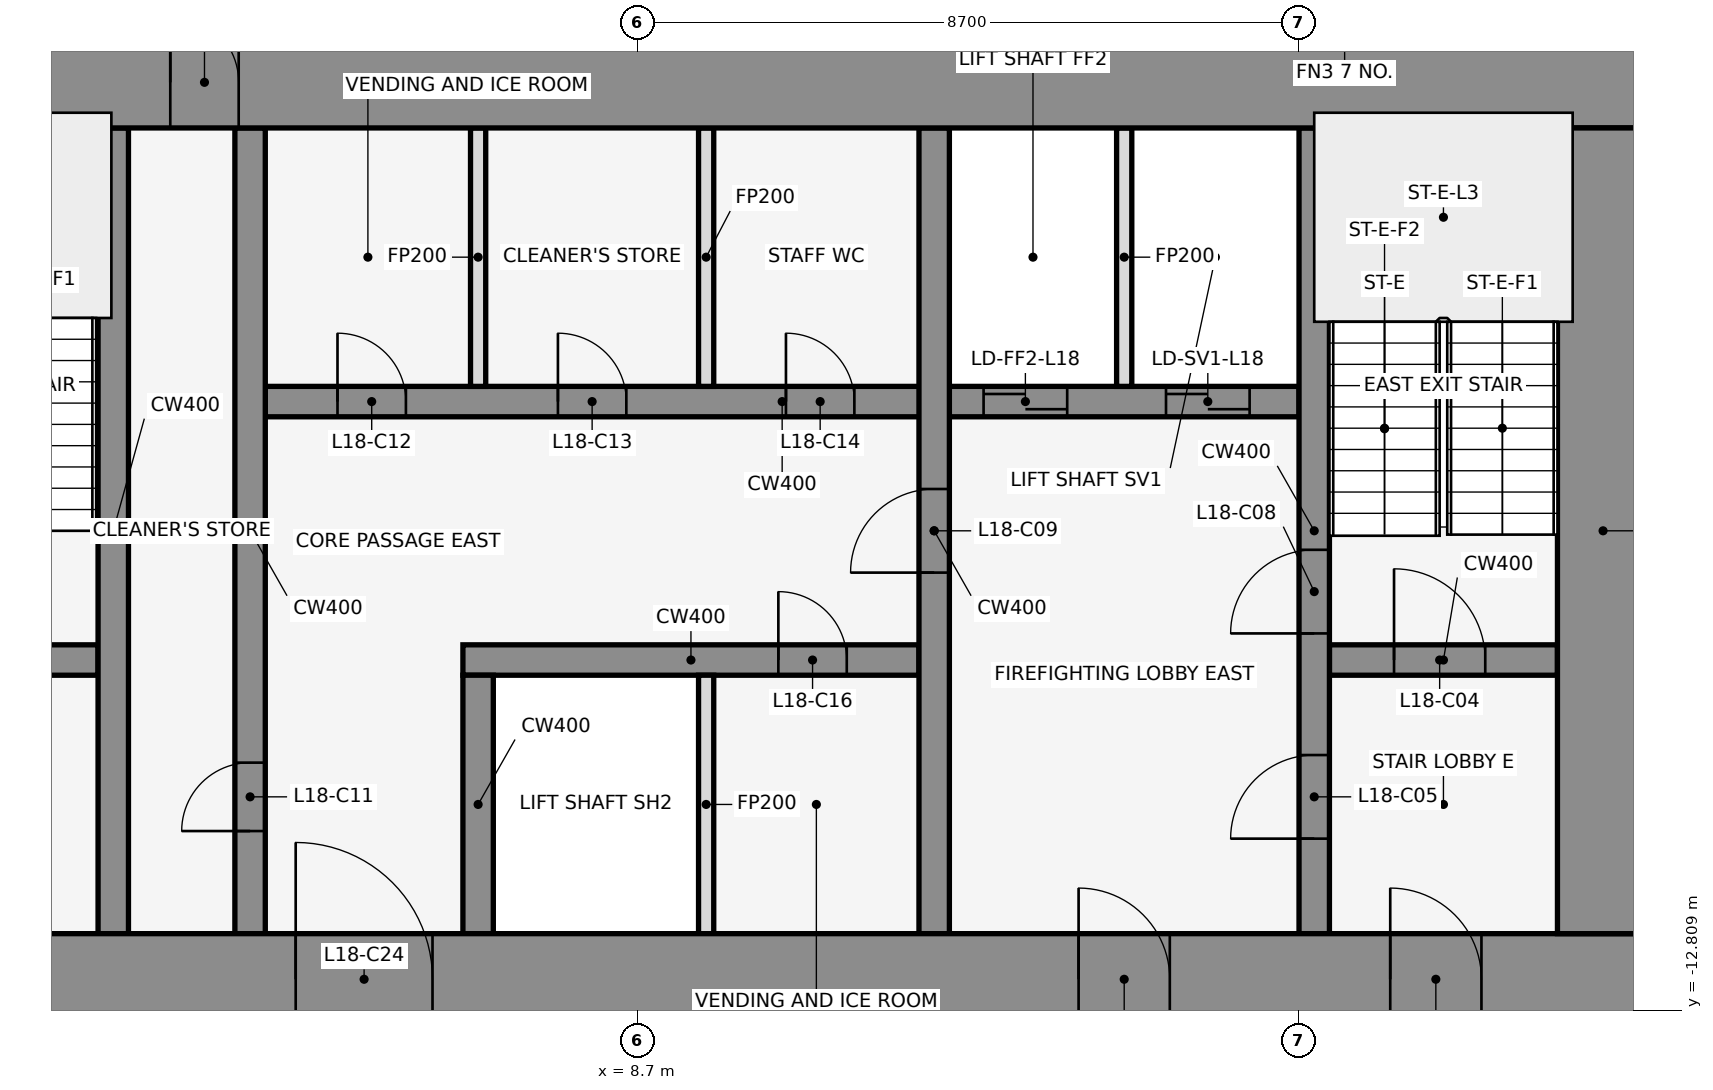
"""IFC4 building model, lengths in metres.
Left out: names, types, materials, properties, quantities, classifications, styles, units other than length and angle.
Written with IfcOpenShell. Run it as: python <this file> out.ifc"""

import sys

from ifc_helpers import new_model, si_unit, direction, frame, frame_2d, origin, place, context, subcontext, project, spatial, rectangle, extrude, element, fill, save


model = new_model("IFC4")
c1 = context("Model", 3, precision=1e-05, world=origin(), true_north=direction((0.0, 1.0)))
c2 = subcontext(c1, "Body", "Model", "MODEL_VIEW")
j1 = project(units=[si_unit("LENGTHUNIT", "METRE"), si_unit("PLANEANGLEUNIT", "RADIAN")], contexts=[c1])
p1 = place(None, origin())
s1 = spatial("IfcSite", under=j1, at=p1, CompositionType="ELEMENT")
p2 = place(p1, origin())
s2 = spatial("IfcBuilding", under=s1, at=p2, CompositionType="ELEMENT")
p3 = place(p2, frame((0.0, 0.0, 89.9)))
s3 = spatial("IfcBuildingStorey", under=s2, at=p3, CompositionType="ELEMENT", Elevation=89.9)
for number, where, z_axis, x_axis in (
    (1, (16.432, -0.105, 0.0), (0.0, 0.0, 1.0), (-0.84, 0.543, 0.0)),
    (2, (1.901, 1.08, 0.0), (0.0, 0.0, 1.0), (-0.84, -0.543, 0.0)),
):
    element("IfcWall", number, at=place(p3, frame(where, z_axis=z_axis, x_axis=x_axis)), inside=s3, PredefinedType="STANDARD", context=c2, shape_type="SweptSolid", body=[
        extrude(rectangle(XDim=2.183, YDim=0.25, at=frame_2d((1.091, 0.0))), origin(), (0.0, 0.0, 1.0), 3.95),
    ])
p4 = place(p3, frame((-1.6, -8.2, 0.0), z_axis=(0.0, 0.0, 1.0), x_axis=(1.0, 0.0, 0.0)))
e3 = element("IfcWall", 3, at=p4, inside=s3, PredefinedType="SHEAR", context=c2, shape_type="SweptSolid", body=[
    extrude(rectangle(XDim=3.2, YDim=0.4, at=frame_2d((1.6, 0.0))), origin(), (0.0, 0.0, 1.0), 4.1),
])
p5 = place(p4, frame((1.05, 0.0, 0.0)))
e4 = element("IfcOpeningElement", 4, at=p5, cuts=e3, PredefinedType="OPENING", context=c2, shape_type="SweptSolid", body=[
    extrude(rectangle(XDim=1.2, YDim=2.1, at=frame_2d((0.6, 1.05))), frame((0.0, 0.212, 0.0), z_axis=(0.0, -1.0, 0.0), x_axis=(1.0, 0.0, 0.0)), (0.0, 0.0, 1.0), 0.424),
])
p6 = place(p3, frame((6.4, -8.2, 0.0), z_axis=(0.0, 0.0, 1.0), x_axis=(1.0, 0.0, 0.0)))
e5 = element("IfcWall", 5, at=p6, inside=s3, PredefinedType="SHEAR", context=c2, shape_type="SweptSolid", body=[
    extrude(rectangle(XDim=6.0, YDim=0.4, at=frame_2d((3.0, 0.0))), origin(), (0.0, 0.0, 1.0), 4.1),
])
p7 = place(p6, frame((4.15, 0.0, 0.0)))
e6 = element("IfcOpeningElement", 6, at=p7, cuts=e5, PredefinedType="OPENING", context=c2, shape_type="SweptSolid", body=[
    extrude(rectangle(XDim=0.9, YDim=2.1, at=frame_2d((0.45, 1.05))), frame((0.0, 0.212, 0.0), z_axis=(0.0, -1.0, 0.0), x_axis=(1.0, 0.0, 0.0)), (0.0, 0.0, 1.0), 0.424),
])
p8 = place(p3, frame((17.8, -8.2, 0.0), z_axis=(0.0, 0.0, 1.0), x_axis=(1.0, 0.0, 0.0)))
e7 = element("IfcWall", 7, at=p8, inside=s3, PredefinedType="SHEAR", context=c2, shape_type="SweptSolid", body=[
    extrude(rectangle(XDim=3.0, YDim=0.4, at=frame_2d((1.5, 0.0))), origin(), (0.0, 0.0, 1.0), 4.1),
])
p9 = place(p8, frame((0.85, 0.0, 0.0)))
e8 = element("IfcOpeningElement", 8, at=p9, cuts=e7, PredefinedType="OPENING", context=c2, shape_type="SweptSolid", body=[
    extrude(rectangle(XDim=1.2, YDim=2.1, at=frame_2d((0.6, 1.05))), frame((0.0, 0.212, 0.0), z_axis=(0.0, -1.0, 0.0), x_axis=(1.0, 0.0, 0.0)), (0.0, 0.0, 1.0), 0.424),
])
p10 = place(p3, frame((3.8, -4.8, 0.0), z_axis=(0.0, 0.0, 1.0), x_axis=(1.0, 0.0, 0.0)))
e9 = element("IfcWall", 9, at=p10, inside=s3, PredefinedType="SHEAR", context=c2, shape_type="SweptSolid", body=[
    extrude(rectangle(XDim=13.6, YDim=0.4, at=frame_2d((6.8, 0.0))), origin(), (0.0, 0.0, 1.0), 4.1),
])
p11 = place(p10, frame((9.45, 0.0, 0.0)))
e10 = element("IfcOpeningElement", 10, at=p11, cuts=e9, PredefinedType="OPENING", context=c2, shape_type="SweptSolid", body=[
    extrude(rectangle(XDim=1.1, YDim=2.1, at=frame_2d((0.55, 1.05))), frame((0.0, 0.212, 0.0), z_axis=(0.0, -1.0, 0.0), x_axis=(1.0, 0.0, 0.0)), (0.0, 0.0, 1.0), 0.424),
])
p12 = place(p10, frame((11.85, 0.0, 0.0)))
e11 = element("IfcOpeningElement", 11, at=p12, cuts=e9, PredefinedType="OPENING", context=c2, shape_type="SweptSolid", body=[
    extrude(rectangle(XDim=1.1, YDim=2.1, at=frame_2d((0.55, 1.05))), frame((0.0, 0.212, 0.0), z_axis=(0.0, -1.0, 0.0), x_axis=(1.0, 0.0, 0.0)), (0.0, 0.0, 1.0), 0.424),
])
p13 = place(p10, frame((0.95, 0.0, 0.0)))
e12 = element("IfcOpeningElement", 12, at=p13, cuts=e9, PredefinedType="OPENING", context=c2, shape_type="SweptSolid", body=[
    extrude(rectangle(XDim=0.9, YDim=2.1, at=frame_2d((0.45, 1.05))), frame((0.0, 0.212, 0.0), z_axis=(0.0, -1.0, 0.0), x_axis=(1.0, 0.0, 0.0)), (0.0, 0.0, 1.0), 0.424),
])
p14 = place(p10, frame((3.85, 0.0, 0.0)))
e13 = element("IfcOpeningElement", 13, at=p14, cuts=e9, PredefinedType="OPENING", context=c2, shape_type="SweptSolid", body=[
    extrude(rectangle(XDim=0.9, YDim=2.1, at=frame_2d((0.45, 1.05))), frame((0.0, 0.212, 0.0), z_axis=(0.0, -1.0, 0.0), x_axis=(1.0, 0.0, 0.0)), (0.0, 0.0, 1.0), 0.424),
])
p15 = place(p10, frame((6.85, 0.0, 0.0)))
e14 = element("IfcOpeningElement", 14, at=p15, cuts=e9, PredefinedType="OPENING", context=c2, shape_type="SweptSolid", body=[
    extrude(rectangle(XDim=0.9, YDim=2.1, at=frame_2d((0.45, 1.05))), frame((0.0, 0.212, 0.0), z_axis=(0.0, -1.0, 0.0), x_axis=(1.0, 0.0, 0.0)), (0.0, 0.0, 1.0), 0.424),
])
p16 = place(p3, frame((1.8, -11.8, 0.0), z_axis=(0.0, 0.0, 1.0), x_axis=(0.0, 1.0, 0.0)))
e15 = element("IfcWall", 15, at=p16, inside=s3, PredefinedType="SHEAR", context=c2, shape_type="SweptSolid", body=[
    extrude(rectangle(XDim=10.6, YDim=0.4, at=frame_2d((5.3, 0.0))), origin(), (0.0, 0.0, 1.0), 4.1),
])
p17 = place(p3, frame((3.6, -11.8, 0.0), z_axis=(0.0, 0.0, 1.0), x_axis=(0.0, 1.0, 0.0)))
e16 = element("IfcWall", 16, at=p17, inside=s3, PredefinedType="SHEAR", context=c2, shape_type="SweptSolid", body=[
    extrude(rectangle(XDim=10.6, YDim=0.4, at=frame_2d((5.3, 0.0))), origin(), (0.0, 0.0, 1.0), 4.1),
])
p18 = place(p17, frame((1.35, 0.0, 0.0)))
e17 = element("IfcOpeningElement", 17, at=p18, cuts=e16, PredefinedType="OPENING", context=c2, shape_type="SweptSolid", body=[
    extrude(rectangle(XDim=0.9, YDim=2.1, at=frame_2d((0.45, 1.05))), frame((0.0, 0.212, 0.0), z_axis=(0.0, -1.0, 0.0), x_axis=(1.0, 0.0, 0.0)), (0.0, 0.0, 1.0), 0.424),
])
p19 = place(p3, frame((6.6, -11.8, 0.0), z_axis=(0.0, 0.0, 1.0), x_axis=(0.0, 1.0, 0.0)))
e18 = element("IfcWall", 18, at=p19, inside=s3, PredefinedType="SHEAR", context=c2, shape_type="SweptSolid", body=[
    extrude(rectangle(XDim=3.4, YDim=0.4, at=frame_2d((1.7, 0.0))), origin(), (0.0, 0.0, 1.0), 4.1),
])
for number, where, z_axis, x_axis in (
    (19, (6.6, -4.6, 0.0), (0.0, 0.0, 1.0), (0.0, 1.0, 0.0)),
    (20, (9.6, -11.8, 0.0), (0.0, 0.0, 1.0), (0.0, 1.0, 0.0)),
    (21, (9.6, -4.6, 0.0), (0.0, 0.0, 1.0), (0.0, 1.0, 0.0)),
):
    element("IfcWall", number, at=place(p3, frame(where, z_axis=z_axis, x_axis=x_axis)), inside=s3, PredefinedType="PARTITIONING", context=c2, shape_type="SweptSolid", body=[
        extrude(rectangle(XDim=3.4, YDim=0.2, at=frame_2d((1.7, 0.0))), origin(), (0.0, 0.0, 1.0), 3.018),
    ])
p20 = place(p3, frame((12.6, -11.8, 0.0), z_axis=(0.0, 0.0, 1.0), x_axis=(0.0, 1.0, 0.0)))
e22 = element("IfcWall", 22, at=p20, inside=s3, PredefinedType="SHEAR", context=c2, shape_type="SweptSolid", body=[
    extrude(rectangle(XDim=10.6, YDim=0.4, at=frame_2d((5.3, 0.0))), origin(), (0.0, 0.0, 1.0), 4.1),
])
p21 = place(p20, frame((4.75, 0.0, 0.0)))
e23 = element("IfcOpeningElement", 23, at=p21, cuts=e22, PredefinedType="OPENING", context=c2, shape_type="SweptSolid", body=[
    extrude(rectangle(XDim=1.1, YDim=2.1, at=frame_2d((0.55, 1.05))), frame((0.0, 0.212, 0.0), z_axis=(0.0, -1.0, 0.0), x_axis=(1.0, 0.0, 0.0)), (0.0, 0.0, 1.0), 0.424),
])
p22 = place(p3, frame((15.1, -4.6, 0.0), z_axis=(0.0, 0.0, 1.0), x_axis=(0.0, 1.0, 0.0)))
e24 = element("IfcWall", 24, at=p22, inside=s3, PredefinedType="PARTITIONING", context=c2, shape_type="SweptSolid", body=[
    extrude(rectangle(XDim=3.4, YDim=0.2, at=frame_2d((1.7, 0.0))), origin(), (0.0, 0.0, 1.0), 3.018),
])
p23 = place(p3, frame((17.6, -11.8, 0.0), z_axis=(0.0, 0.0, 1.0), x_axis=(0.0, 1.0, 0.0)))
e25 = element("IfcWall", 25, at=p23, inside=s3, PredefinedType="SHEAR", context=c2, shape_type="SweptSolid", body=[
    extrude(rectangle(XDim=10.6, YDim=0.4, at=frame_2d((5.3, 0.0))), origin(), (0.0, 0.0, 1.0), 4.1),
])
p24 = place(p23, frame((1.25, 0.0, 0.0)))
e26 = element("IfcOpeningElement", 26, at=p24, cuts=e25, PredefinedType="OPENING", context=c2, shape_type="SweptSolid", body=[
    extrude(rectangle(XDim=1.1, YDim=2.1, at=frame_2d((0.55, 1.05))), frame((0.0, 0.212, 0.0), z_axis=(0.0, -1.0, 0.0), x_axis=(1.0, 0.0, 0.0)), (0.0, 0.0, 1.0), 0.424),
])
p25 = place(p23, frame((3.95, 0.0, 0.0)))
e27 = element("IfcOpeningElement", 27, at=p25, cuts=e25, PredefinedType="OPENING", context=c2, shape_type="SweptSolid", body=[
    extrude(rectangle(XDim=1.1, YDim=2.1, at=frame_2d((0.55, 1.05))), frame((0.0, 0.212, 0.0), z_axis=(0.0, -1.0, 0.0), x_axis=(1.0, 0.0, 0.0)), (0.0, 0.0, 1.0), 0.424),
])
p26 = place(p3, frame((-22.0, -0.6, 0.0), z_axis=(0.0, 0.0, 1.0), x_axis=(1.0, 0.0, 0.0)))
e28 = element("IfcWall", 28, at=p26, inside=s3, PredefinedType="SHEAR", context=c2, shape_type="SweptSolid", body=[
    extrude(rectangle(XDim=44.0, YDim=1.2, at=frame_2d((22.0, 0.0))), origin(), (0.0, 0.0, 1.0), 4.1),
])
p27 = place(p26, frame((18.55, 0.0, 0.0)))
e29 = element("IfcOpeningElement", 29, at=p27, cuts=e28, PredefinedType="OPENING", context=c2, shape_type="SweptSolid", body=[
    extrude(rectangle(XDim=0.9, YDim=2.1, at=frame_2d((0.45, 1.05))), frame((0.0, 0.612, 0.0), z_axis=(0.0, -1.0, 0.0), x_axis=(1.0, 0.0, 0.0)), (0.0, 0.0, 1.0), 1.224),
])
p28 = place(p26, frame((24.55, 0.0, 0.0)))
e30 = element("IfcOpeningElement", 30, at=p28, cuts=e28, PredefinedType="OPENING", context=c2, shape_type="SweptSolid", body=[
    extrude(rectangle(XDim=0.9, YDim=2.1, at=frame_2d((0.45, 1.05))), frame((0.0, 0.612, 0.0), z_axis=(0.0, -1.0, 0.0), x_axis=(1.0, 0.0, 0.0)), (0.0, 0.0, 1.0), 1.224),
])
p29 = place(p3, frame((-22.0, -12.4, 0.0), z_axis=(0.0, 0.0, 1.0), x_axis=(1.0, 0.0, 0.0)))
e31 = element("IfcWall", 31, at=p29, inside=s3, PredefinedType="SHEAR", context=c2, shape_type="SweptSolid", body=[
    extrude(rectangle(XDim=44.0, YDim=1.2, at=frame_2d((22.0, 0.0))), origin(), (0.0, 0.0, 1.0), 4.1),
])
p30 = place(p29, frame((2.2, 0.0, 0.0)))
e32 = element("IfcOpeningElement", 32, at=p30, cuts=e31, PredefinedType="OPENING", context=c2, shape_type="SweptSolid", body=[
    extrude(rectangle(XDim=1.2, YDim=2.1, at=frame_2d((0.6, 1.05))), frame((0.0, 0.612, 0.0), z_axis=(0.0, -1.0, 0.0), x_axis=(1.0, 0.0, 0.0)), (0.0, 0.0, 1.0), 1.224),
])
p31 = place(p29, frame((21.4, 0.0, 0.0)))
e33 = element("IfcOpeningElement", 33, at=p31, cuts=e31, PredefinedType="OPENING", context=c2, shape_type="SweptSolid", body=[
    extrude(rectangle(XDim=1.2, YDim=2.1, at=frame_2d((0.6, 1.05))), frame((0.0, 0.612, 0.0), z_axis=(0.0, -1.0, 0.0), x_axis=(1.0, 0.0, 0.0)), (0.0, 0.0, 1.0), 1.224),
])
p32 = place(p29, frame((40.6, 0.0, 0.0)))
e34 = element("IfcOpeningElement", 34, at=p32, cuts=e31, PredefinedType="OPENING", context=c2, shape_type="SweptSolid", body=[
    extrude(rectangle(XDim=1.2, YDim=2.1, at=frame_2d((0.6, 1.05))), frame((0.0, 0.612, 0.0), z_axis=(0.0, -1.0, 0.0), x_axis=(1.0, 0.0, 0.0)), (0.0, 0.0, 1.0), 1.224),
])
p33 = place(p29, frame((16.0, 0.0, 0.0)))
e35 = element("IfcOpeningElement", 35, at=p33, cuts=e31, PredefinedType="OPENING", context=c2, shape_type="SweptSolid", body=[
    extrude(rectangle(XDim=1.8, YDim=2.1, at=frame_2d((0.9, 1.05))), frame((0.0, 0.612, 0.0), z_axis=(0.0, -1.0, 0.0), x_axis=(1.0, 0.0, 0.0)), (0.0, 0.0, 1.0), 1.224),
])
p34 = place(p29, frame((6.3, 0.0, 0.0)))
e36 = element("IfcOpeningElement", 36, at=p34, cuts=e31, PredefinedType="OPENING", context=c2, shape_type="SweptSolid", body=[
    extrude(rectangle(XDim=1.2, YDim=2.1, at=frame_2d((0.6, 1.05))), frame((0.0, 0.612, 0.0), z_axis=(0.0, -1.0, 0.0), x_axis=(1.0, 0.0, 0.0)), (0.0, 0.0, 1.0), 1.224),
])
p35 = place(p29, frame((26.2, 0.0, 0.0)))
e37 = element("IfcOpeningElement", 37, at=p35, cuts=e31, PredefinedType="OPENING", context=c2, shape_type="SweptSolid", body=[
    extrude(rectangle(XDim=1.8, YDim=2.1, at=frame_2d((0.9, 1.05))), frame((0.0, 0.612, 0.0), z_axis=(0.0, -1.0, 0.0), x_axis=(1.0, 0.0, 0.0)), (0.0, 0.0, 1.0), 1.224),
])
p36 = place(p29, frame((36.5, 0.0, 0.0)))
e38 = element("IfcOpeningElement", 38, at=p36, cuts=e31, PredefinedType="OPENING", context=c2, shape_type="SweptSolid", body=[
    extrude(rectangle(XDim=1.2, YDim=2.1, at=frame_2d((0.6, 1.05))), frame((0.0, 0.612, 0.0), z_axis=(0.0, -1.0, 0.0), x_axis=(1.0, 0.0, 0.0)), (0.0, 0.0, 1.0), 1.224),
])
p37 = place(p3, frame((21.4, -11.8, 0.0), z_axis=(0.0, 0.0, 1.0), x_axis=(0.0, 1.0, 0.0)))
e39 = element("IfcWall", 39, at=p37, inside=s3, PredefinedType="SHEAR", context=c2, shape_type="SweptSolid", body=[
    extrude(rectangle(XDim=10.6, YDim=1.2, at=frame_2d((5.3, 0.0))), origin(), (0.0, 0.0, 1.0), 4.1),
])
p38 = place(p9, origin())
e40 = element("IfcDoor", 40, at=p38, inside=s3, OperationType="SINGLE_SWING_RIGHT", PredefinedType="DOOR", context=c2, shape_type="SweptSolid", body=[
    extrude(rectangle(XDim=1.2, YDim=2.1, at=frame_2d((0.6, 1.05))), frame((0.0, 0.025, 0.0), z_axis=(0.0, -1.0, 0.0), x_axis=(1.0, 0.0, 0.0)), (0.0, 0.0, 1.0), 0.05),
])
fill(e8, e40)
p39 = place(p24, origin())
e41 = element("IfcDoor", 41, at=p39, inside=s3, OperationType="SINGLE_SWING_LEFT", PredefinedType="DOOR", context=c2, shape_type="SweptSolid", body=[
    extrude(rectangle(XDim=1.1, YDim=2.1, at=frame_2d((0.55, 1.05))), frame((0.0, 0.025, 0.0), z_axis=(0.0, -1.0, 0.0), x_axis=(1.0, 0.0, 0.0)), (0.0, 0.0, 1.0), 0.05),
])
fill(e26, e41)
p40 = place(p11, origin())
e42 = element("IfcDoor", 42, at=p40, inside=s3, OperationType="DOUBLE_DOOR_SLIDING", PredefinedType="DOOR", context=c2, shape_type="SweptSolid", body=[
    extrude(rectangle(XDim=1.1, YDim=2.1, at=frame_2d((0.55, 1.05))), frame((0.0, 0.025, 0.0), z_axis=(0.0, -1.0, 0.0), x_axis=(1.0, 0.0, 0.0)), (0.0, 0.0, 1.0), 0.05),
])
fill(e10, e42)
p41 = place(p12, origin())
e43 = element("IfcDoor", 43, at=p41, inside=s3, OperationType="DOUBLE_DOOR_SLIDING", PredefinedType="DOOR", context=c2, shape_type="SweptSolid", body=[
    extrude(rectangle(XDim=1.1, YDim=2.1, at=frame_2d((0.55, 1.05))), frame((0.0, 0.025, 0.0), z_axis=(0.0, -1.0, 0.0), x_axis=(1.0, 0.0, 0.0)), (0.0, 0.0, 1.0), 0.05),
])
fill(e11, e43)
p42 = place(p25, origin())
e44 = element("IfcDoor", 44, at=p42, inside=s3, OperationType="SINGLE_SWING_RIGHT", PredefinedType="DOOR", context=c2, shape_type="SweptSolid", body=[
    extrude(rectangle(XDim=1.1, YDim=2.1, at=frame_2d((0.55, 1.05))), frame((0.0, 0.025, 0.0), z_axis=(0.0, -1.0, 0.0), x_axis=(1.0, 0.0, 0.0)), (0.0, 0.0, 1.0), 0.05),
])
fill(e27, e44)
p43 = place(p21, frame((1.1, 0.0, 0.0), z_axis=(0.0, 0.0, 1.0), x_axis=(-1.0, 0.0, 0.0)))
e45 = element("IfcDoor", 45, at=p43, inside=s3, OperationType="SINGLE_SWING_RIGHT", PredefinedType="DOOR", context=c2, shape_type="SweptSolid", body=[
    extrude(rectangle(XDim=1.1, YDim=2.1, at=frame_2d((0.55, 1.05))), frame((0.0, 0.025, 0.0), z_axis=(0.0, -1.0, 0.0), x_axis=(1.0, 0.0, 0.0)), (0.0, 0.0, 1.0), 0.05),
])
fill(e23, e45)
p44 = place(p18, origin())
e46 = element("IfcDoor", 46, at=p44, inside=s3, OperationType="SINGLE_SWING_LEFT", PredefinedType="DOOR", context=c2, shape_type="SweptSolid", body=[
    extrude(rectangle(XDim=0.9, YDim=2.1, at=frame_2d((0.45, 1.05))), frame((0.0, 0.025, 0.0), z_axis=(0.0, -1.0, 0.0), x_axis=(1.0, 0.0, 0.0)), (0.0, 0.0, 1.0), 0.05),
])
fill(e17, e46)
p45 = place(p13, origin())
e47 = element("IfcDoor", 47, at=p45, inside=s3, OperationType="SINGLE_SWING_RIGHT", PredefinedType="DOOR", context=c2, shape_type="SweptSolid", body=[
    extrude(rectangle(XDim=0.9, YDim=2.1, at=frame_2d((0.45, 1.05))), frame((0.0, 0.025, 0.0), z_axis=(0.0, -1.0, 0.0), x_axis=(1.0, 0.0, 0.0)), (0.0, 0.0, 1.0), 0.05),
])
fill(e12, e47)
p46 = place(p14, origin())
e48 = element("IfcDoor", 48, at=p46, inside=s3, OperationType="SINGLE_SWING_LEFT", PredefinedType="DOOR", context=c2, shape_type="SweptSolid", body=[
    extrude(rectangle(XDim=0.9, YDim=2.1, at=frame_2d((0.45, 1.05))), frame((0.0, 0.025, 0.0), z_axis=(0.0, -1.0, 0.0), x_axis=(1.0, 0.0, 0.0)), (0.0, 0.0, 1.0), 0.05),
])
fill(e13, e48)
p47 = place(p15, origin())
e49 = element("IfcDoor", 49, at=p47, inside=s3, OperationType="SINGLE_SWING_RIGHT", PredefinedType="DOOR", context=c2, shape_type="SweptSolid", body=[
    extrude(rectangle(XDim=0.9, YDim=2.1, at=frame_2d((0.45, 1.05))), frame((0.0, 0.025, 0.0), z_axis=(0.0, -1.0, 0.0), x_axis=(1.0, 0.0, 0.0)), (0.0, 0.0, 1.0), 0.05),
])
fill(e14, e49)
p48 = place(p7, frame((0.9, 0.0, 0.0), z_axis=(0.0, 0.0, 1.0), x_axis=(-1.0, 0.0, 0.0)))
e50 = element("IfcDoor", 50, at=p48, inside=s3, OperationType="SINGLE_SWING_LEFT", PredefinedType="DOOR", context=c2, shape_type="SweptSolid", body=[
    extrude(rectangle(XDim=0.9, YDim=2.1, at=frame_2d((0.45, 1.05))), frame((0.0, 0.025, 0.0), z_axis=(0.0, -1.0, 0.0), x_axis=(1.0, 0.0, 0.0)), (0.0, 0.0, 1.0), 0.05),
])
fill(e6, e50)
p49 = place(p28, origin())
e51 = element("IfcDoor", 51, at=p49, inside=s3, OperationType="SINGLE_SWING_LEFT", PredefinedType="DOOR", context=c2, shape_type="SweptSolid", body=[
    extrude(rectangle(XDim=0.9, YDim=2.1, at=frame_2d((0.45, 1.05))), frame((0.0, 0.025, 0.0), z_axis=(0.0, -1.0, 0.0), x_axis=(1.0, 0.0, 0.0)), (0.0, 0.0, 1.0), 0.05),
])
fill(e30, e51)
p50 = place(p32, frame((1.2, 0.0, 0.0), z_axis=(0.0, 0.0, 1.0), x_axis=(-1.0, 0.0, 0.0)))
e52 = element("IfcDoor", 52, at=p50, inside=s3, OperationType="SINGLE_SWING_RIGHT", PredefinedType="DOOR", context=c2, shape_type="SweptSolid", body=[
    extrude(rectangle(XDim=1.2, YDim=2.1, at=frame_2d((0.6, 1.05))), frame((0.0, 0.025, 0.0), z_axis=(0.0, -1.0, 0.0), x_axis=(1.0, 0.0, 0.0)), (0.0, 0.0, 1.0), 0.05),
])
fill(e34, e52)
p51 = place(p35, origin())
e53 = element("IfcDoor", 53, at=p51, inside=s3, OperationType="SINGLE_SWING_LEFT", PredefinedType="DOOR", context=c2, shape_type="SweptSolid", body=[
    extrude(rectangle(XDim=1.8, YDim=2.1, at=frame_2d((0.9, 1.05))), frame((0.0, 0.025, 0.0), z_axis=(0.0, -1.0, 0.0), x_axis=(1.0, 0.0, 0.0)), (0.0, 0.0, 1.0), 0.05),
])
fill(e37, e53)
p52 = place(p36, frame((1.2, 0.0, 0.0), z_axis=(0.0, 0.0, 1.0), x_axis=(-1.0, 0.0, 0.0)))
e54 = element("IfcDoor", 54, at=p52, inside=s3, OperationType="SINGLE_SWING_RIGHT", PredefinedType="DOOR", context=c2, shape_type="SweptSolid", body=[
    extrude(rectangle(XDim=1.2, YDim=2.1, at=frame_2d((0.6, 1.05))), frame((0.0, 0.025, 0.0), z_axis=(0.0, -1.0, 0.0), x_axis=(1.0, 0.0, 0.0)), (0.0, 0.0, 1.0), 0.05),
])
fill(e38, e54)
save(model, sys.argv[1])
